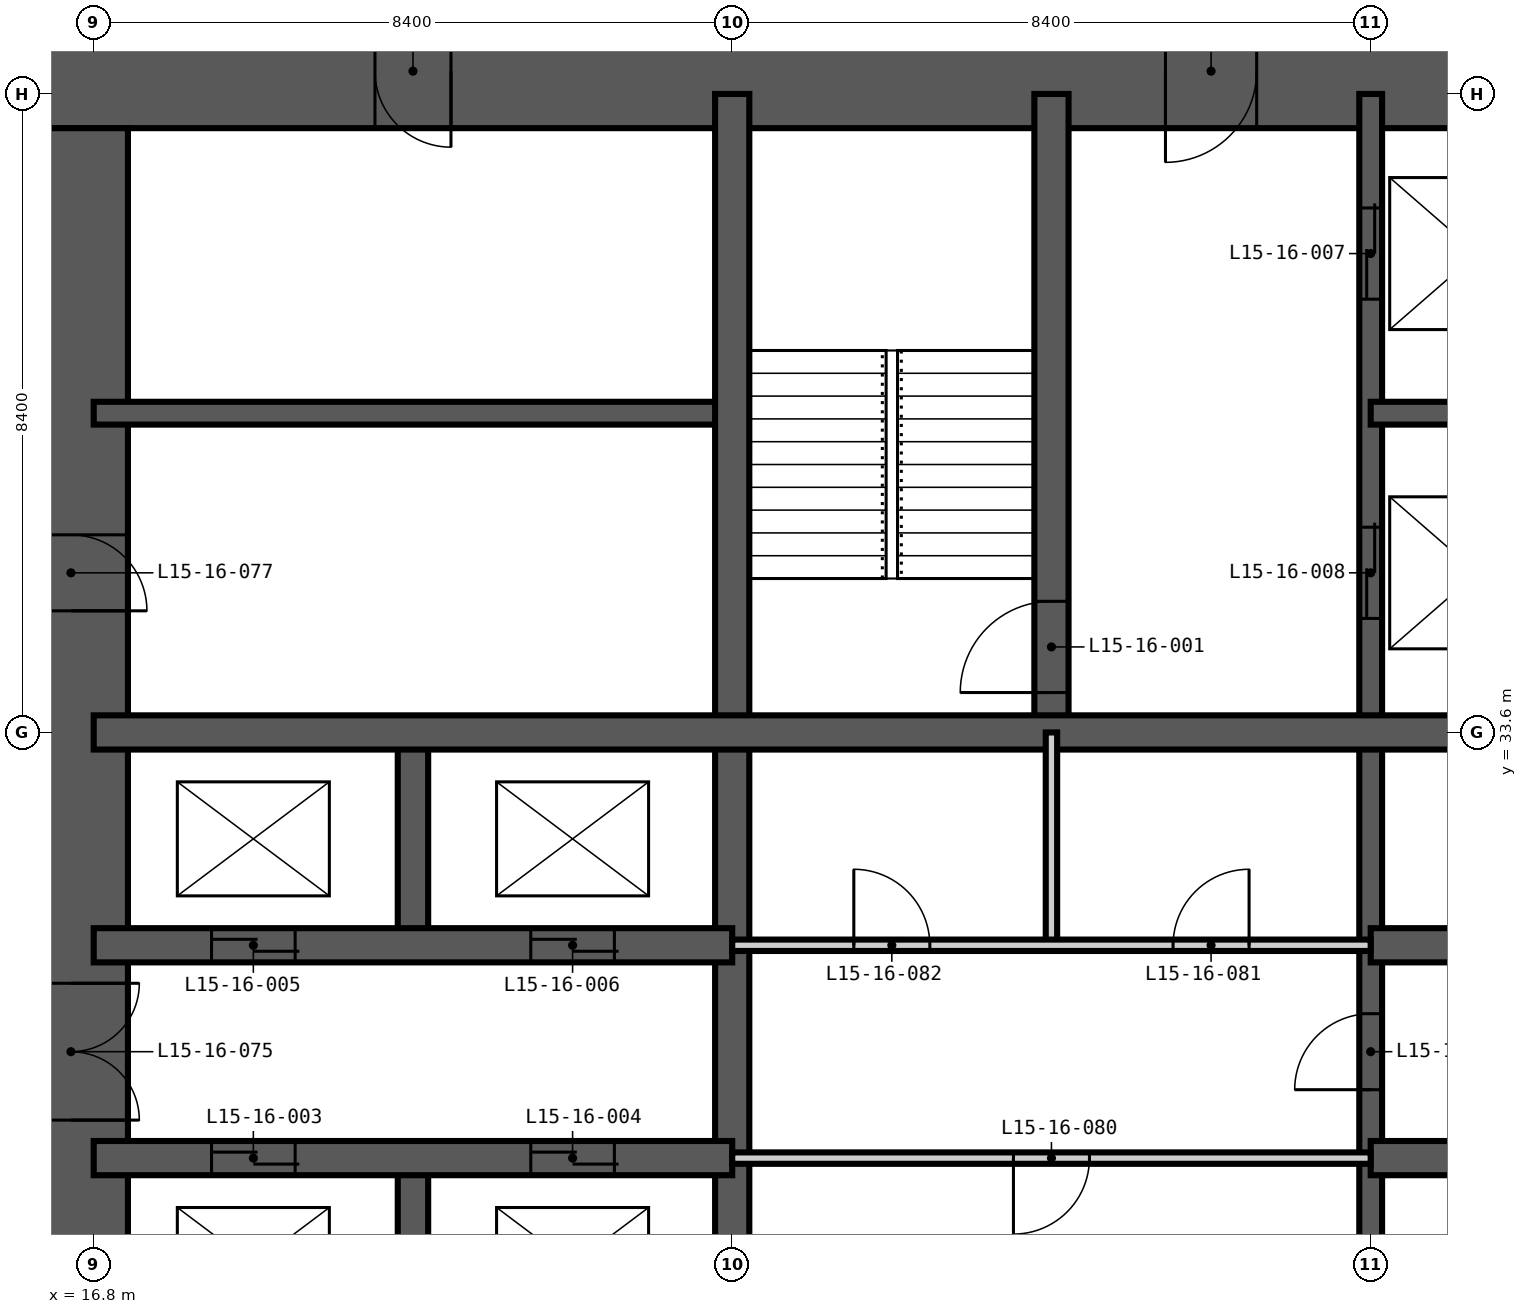
"""IFC4 building model, lengths in metres.
Left out: names, types, materials, properties, quantities, classifications, styles, units other than length and angle.
Written with IfcOpenShell. Run it as: python <this file> out.ifc"""

import sys

from ifc_helpers import new_model, si_unit, direction, frame, frame_2d, origin, place, context, subcontext, project, spatial, rectangle, extrude, element, fill, save


model = new_model("IFC4")
c1 = context("Model", 3, precision=1e-05, world=origin(), true_north=direction((0.0, 1.0)))
c2 = subcontext(c1, "Body", "Model", "MODEL_VIEW")
j1 = project(units=[si_unit("LENGTHUNIT", "METRE"), si_unit("PLANEANGLEUNIT", "RADIAN")], contexts=[c1])
p1 = place(None, origin())
s1 = spatial("IfcSite", under=j1, at=p1, CompositionType="ELEMENT")
p2 = place(p1, origin())
s2 = spatial("IfcBuilding", under=s1, at=p2, CompositionType="ELEMENT")
p3 = place(p2, frame((0.0, 0.0, 63.0)))
s3 = spatial("IfcBuildingStorey", under=s2, at=p3, CompositionType="ELEMENT", Elevation=63.0)
p4 = place(p3, frame((43.05, 42.3, -0.35), z_axis=(0.0, 0.0, 1.0), x_axis=(-1.0, 0.0, 0.0)))
e1 = element("IfcWall", 1, at=p4, inside=s3, PredefinedType="SHEAR", context=c2, shape_type="SweptSolid", body=[
    extrude(rectangle(XDim=27.3, YDim=1.5, at=frame_2d((13.65, 0.0))), origin(), (0.0, 0.0, 1.0), 3.6),
])
p5 = place(p4, frame((21.55, 0.0, 0.35)))
e2 = element("IfcOpeningElement", 2, at=p5, cuts=e1, PredefinedType="OPENING", context=c2, shape_type="SweptSolid", body=[
    extrude(rectangle(XDim=1.0, YDim=2.1, at=frame_2d((0.5, 1.05))), frame((0.0, 0.76, 0.0), z_axis=(0.0, -1.0, 0.0), x_axis=(1.0, 0.0, 0.0)), (0.0, 0.0, 1.0), 1.52),
])
p6 = place(p4, frame((10.95, 0.0, 0.35)))
e3 = element("IfcOpeningElement", 3, at=p6, cuts=e1, PredefinedType="OPENING", context=c2, shape_type="SweptSolid", body=[
    extrude(rectangle(XDim=1.2, YDim=2.2, at=frame_2d((0.6, 1.1))), frame((0.0, 0.76, 0.0), z_axis=(0.0, -1.0, 0.0), x_axis=(1.0, 0.0, 0.0)), (0.0, 0.0, 1.0), 1.52),
])
p7 = place(p3, frame((16.5, 41.55, -0.35), z_axis=(0.0, 0.0, 1.0), x_axis=(0.0, -1.0, 0.0)))
e4 = element("IfcWall", 4, at=p7, inside=s3, PredefinedType="SHEAR", context=c2, shape_type="SweptSolid", body=[
    extrude(rectangle(XDim=24.3, YDim=1.5, at=frame_2d((12.15, 0.0))), origin(), (0.0, 0.0, 1.0), 3.6),
])
p8 = place(p7, frame((11.25, 0.0, 0.35)))
e5 = element("IfcOpeningElement", 5, at=p8, cuts=e4, PredefinedType="OPENING", context=c2, shape_type="SweptSolid", body=[
    extrude(rectangle(XDim=1.8, YDim=2.2, at=frame_2d((0.9, 1.1))), frame((0.0, 0.76, 0.0), z_axis=(0.0, -1.0, 0.0), x_axis=(1.0, 0.0, 0.0)), (0.0, 0.0, 1.0), 1.52),
])
p9 = place(p7, frame((20.05, 0.0, 0.35)))
e6 = element("IfcOpeningElement", 6, at=p9, cuts=e4, PredefinedType="OPENING", context=c2, shape_type="SweptSolid", body=[
    extrude(rectangle(XDim=1.0, YDim=2.1, at=frame_2d((0.5, 1.05))), frame((0.0, 0.76, 0.0), z_axis=(0.0, -1.0, 0.0), x_axis=(1.0, 0.0, 0.0)), (0.0, 0.0, 1.0), 1.52),
])
p10 = place(p7, frame((5.35, 0.0, 0.35)))
e7 = element("IfcOpeningElement", 7, at=p10, cuts=e4, PredefinedType="OPENING", context=c2, shape_type="SweptSolid", body=[
    extrude(rectangle(XDim=1.0, YDim=2.1, at=frame_2d((0.5, 1.05))), frame((0.0, 0.76, 0.0), z_axis=(0.0, -1.0, 0.0), x_axis=(1.0, 0.0, 0.0)), (0.0, 0.0, 1.0), 1.52),
])
p11 = place(p3, frame((33.6, 16.8, -0.35), z_axis=(0.0, 0.0, 1.0), x_axis=(0.0, 1.0, 0.0)))
e8 = element("IfcWall", 8, at=p11, inside=s3, PredefinedType="SHEAR", context=c2, shape_type="SweptSolid", body=[
    extrude(rectangle(XDim=25.2, YDim=0.3, at=frame_2d((12.6, 0.0))), origin(), (0.0, 0.0, 1.0), 3.6),
])
p12 = place(p11, frame((22.5, 0.0, 0.35)))
e9 = element("IfcOpeningElement", 9, at=p12, cuts=e8, PredefinedType="OPENING", context=c2, shape_type="SweptSolid", body=[
    extrude(rectangle(XDim=1.2, YDim=2.2, at=frame_2d((0.6, 1.1))), frame((0.0, 0.16, 0.0), z_axis=(0.0, -1.0, 0.0), x_axis=(1.0, 0.0, 0.0)), (0.0, 0.0, 1.0), 0.32),
])
p13 = place(p11, frame((18.3, 0.0, 0.35)))
e10 = element("IfcOpeningElement", 10, at=p13, cuts=e8, PredefinedType="OPENING", context=c2, shape_type="SweptSolid", body=[
    extrude(rectangle(XDim=1.2, YDim=2.2, at=frame_2d((0.6, 1.1))), frame((0.0, 0.16, 0.0), z_axis=(0.0, -1.0, 0.0), x_axis=(1.0, 0.0, 0.0)), (0.0, 0.0, 1.0), 0.32),
])
p14 = place(p11, frame((12.1, 0.0, 0.35)))
e11 = element("IfcOpeningElement", 11, at=p14, cuts=e8, PredefinedType="OPENING", context=c2, shape_type="SweptSolid", body=[
    extrude(rectangle(XDim=1.0, YDim=2.1, at=frame_2d((0.5, 1.05))), frame((0.0, 0.16, 0.0), z_axis=(0.0, -1.0, 0.0), x_axis=(1.0, 0.0, 0.0)), (0.0, 0.0, 1.0), 0.32),
])
p15 = place(p3, frame((16.8, 37.8, -0.35), z_axis=(0.0, 0.0, 1.0), x_axis=(1.0, 0.0, 0.0)))
e12 = element("IfcWall", 12, at=p15, inside=s3, PredefinedType="SHEAR", context=c2, shape_type="SweptSolid", body=[
    extrude(rectangle(XDim=8.4, YDim=0.3, at=frame_2d((4.2, 0.0))), origin(), (0.0, 0.0, 1.0), 3.6),
])
p16 = place(p3, frame((33.6, 37.8, -0.35), z_axis=(0.0, 0.0, 1.0), x_axis=(1.0, 0.0, 0.0)))
e13 = element("IfcWall", 13, at=p16, inside=s3, PredefinedType="SHEAR", context=c2, shape_type="SweptSolid", body=[
    extrude(rectangle(XDim=2.8, YDim=0.3, at=frame_2d((1.4, 0.0))), origin(), (0.0, 0.0, 1.0), 3.6),
])
for number, where, z_axis, x_axis in (
    (14, (21.0, 25.2, -0.35), (0.0, 0.0, 1.0), (0.0, 1.0, 0.0)),
    (15, (21.0, 30.8, -0.35), (0.0, 0.0, 1.0), (0.0, 1.0, 0.0)),
):
    element("IfcWall", number, at=place(p3, frame(where, z_axis=z_axis, x_axis=x_axis)), inside=s3, PredefinedType="SHEAR", context=c2, shape_type="SweptSolid", body=[
        extrude(rectangle(XDim=2.8, YDim=0.4, at=frame_2d((1.4, 0.0))), origin(), (0.0, 0.0, 1.0), 3.6),
    ])
p17 = place(p3, frame((25.2, 16.8, -0.35), z_axis=(0.0, 0.0, 1.0), x_axis=(0.0, 1.0, 0.0)))
e16 = element("IfcWall", 16, at=p17, inside=s3, PredefinedType="SHEAR", context=c2, shape_type="SweptSolid", body=[
    extrude(rectangle(XDim=25.2, YDim=0.45, at=frame_2d((12.6, 0.0))), origin(), (0.0, 0.0, 1.0), 3.6),
])
p18 = place(p3, frame((29.4, 33.6, -0.35), z_axis=(0.0, 0.0, 1.0), x_axis=(0.0, 1.0, 0.0)))
e17 = element("IfcWall", 17, at=p18, inside=s3, PredefinedType="SHEAR", context=c2, shape_type="SweptSolid", body=[
    extrude(rectangle(XDim=8.4, YDim=0.45, at=frame_2d((4.2, 0.0))), origin(), (0.0, 0.0, 1.0), 3.6),
])
p19 = place(p18, frame((0.525, 0.0, 0.35)))
e18 = element("IfcOpeningElement", 18, at=p19, cuts=e17, PredefinedType="OPENING", context=c2, shape_type="SweptSolid", body=[
    extrude(rectangle(XDim=1.2, YDim=2.2, at=frame_2d((0.6, 1.1))), frame((0.0, 0.235, 0.0), z_axis=(0.0, -1.0, 0.0), x_axis=(1.0, 0.0, 0.0)), (0.0, 0.0, 1.0), 0.47),
])
p20 = place(p3, frame((16.8, 28.0, -0.35), z_axis=(0.0, 0.0, 1.0), x_axis=(1.0, 0.0, 0.0)))
e19 = element("IfcWall", 19, at=p20, inside=s3, PredefinedType="SHEAR", context=c2, shape_type="SweptSolid", body=[
    extrude(rectangle(XDim=8.4, YDim=0.45, at=frame_2d((4.2, 0.0))), origin(), (0.0, 0.0, 1.0), 3.6),
])
p21 = place(p20, frame((1.55, 0.0, 0.35)))
e20 = element("IfcOpeningElement", 20, at=p21, cuts=e19, PredefinedType="OPENING", context=c2, shape_type="SweptSolid", body=[
    extrude(rectangle(XDim=1.1, YDim=2.2, at=frame_2d((0.55, 1.1))), frame((0.0, 0.235, 0.0), z_axis=(0.0, -1.0, 0.0), x_axis=(1.0, 0.0, 0.0)), (0.0, 0.0, 1.0), 0.47),
])
p22 = place(p20, frame((5.75, 0.0, 0.35)))
e21 = element("IfcOpeningElement", 21, at=p22, cuts=e19, PredefinedType="OPENING", context=c2, shape_type="SweptSolid", body=[
    extrude(rectangle(XDim=1.1, YDim=2.2, at=frame_2d((0.55, 1.1))), frame((0.0, 0.235, 0.0), z_axis=(0.0, -1.0, 0.0), x_axis=(1.0, 0.0, 0.0)), (0.0, 0.0, 1.0), 0.47),
])
p23 = place(p3, frame((33.6, 28.0, -0.35), z_axis=(0.0, 0.0, 1.0), x_axis=(1.0, 0.0, 0.0)))
e22 = element("IfcWall", 22, at=p23, inside=s3, PredefinedType="SHEAR", context=c2, shape_type="SweptSolid", body=[
    extrude(rectangle(XDim=8.4, YDim=0.45, at=frame_2d((4.2, 0.0))), origin(), (0.0, 0.0, 1.0), 3.6),
])
p24 = place(p3, frame((16.8, 30.8, -0.35), z_axis=(0.0, 0.0, 1.0), x_axis=(1.0, 0.0, 0.0)))
e23 = element("IfcWall", 23, at=p24, inside=s3, PredefinedType="SHEAR", context=c2, shape_type="SweptSolid", body=[
    extrude(rectangle(XDim=8.4, YDim=0.45, at=frame_2d((4.2, 0.0))), origin(), (0.0, 0.0, 1.0), 3.6),
])
p25 = place(p24, frame((1.55, 0.0, 0.35)))
e24 = element("IfcOpeningElement", 24, at=p25, cuts=e23, PredefinedType="OPENING", context=c2, shape_type="SweptSolid", body=[
    extrude(rectangle(XDim=1.1, YDim=2.2, at=frame_2d((0.55, 1.1))), frame((0.0, 0.235, 0.0), z_axis=(0.0, -1.0, 0.0), x_axis=(1.0, 0.0, 0.0)), (0.0, 0.0, 1.0), 0.47),
])
p26 = place(p24, frame((5.75, 0.0, 0.35)))
e25 = element("IfcOpeningElement", 25, at=p26, cuts=e23, PredefinedType="OPENING", context=c2, shape_type="SweptSolid", body=[
    extrude(rectangle(XDim=1.1, YDim=2.2, at=frame_2d((0.55, 1.1))), frame((0.0, 0.235, 0.0), z_axis=(0.0, -1.0, 0.0), x_axis=(1.0, 0.0, 0.0)), (0.0, 0.0, 1.0), 0.47),
])
p27 = place(p3, frame((33.6, 30.8, -0.35), z_axis=(0.0, 0.0, 1.0), x_axis=(1.0, 0.0, 0.0)))
e26 = element("IfcWall", 26, at=p27, inside=s3, PredefinedType="SHEAR", context=c2, shape_type="SweptSolid", body=[
    extrude(rectangle(XDim=8.4, YDim=0.45, at=frame_2d((4.2, 0.0))), origin(), (0.0, 0.0, 1.0), 3.6),
])
p28 = place(p27, frame((1.6, 0.0, 0.35)))
e27 = element("IfcOpeningElement", 27, at=p28, cuts=e26, PredefinedType="OPENING", context=c2, shape_type="SweptSolid", body=[
    extrude(rectangle(XDim=1.0, YDim=2.1, at=frame_2d((0.5, 1.05))), frame((0.0, 0.235, 0.0), z_axis=(0.0, -1.0, 0.0), x_axis=(1.0, 0.0, 0.0)), (0.0, 0.0, 1.0), 0.47),
])
p29 = place(p27, frame((4.6, 0.0, 0.35)))
e28 = element("IfcOpeningElement", 28, at=p29, cuts=e26, PredefinedType="OPENING", context=c2, shape_type="SweptSolid", body=[
    extrude(rectangle(XDim=1.0, YDim=2.1, at=frame_2d((0.5, 1.05))), frame((0.0, 0.235, 0.0), z_axis=(0.0, -1.0, 0.0), x_axis=(1.0, 0.0, 0.0)), (0.0, 0.0, 1.0), 0.47),
])
p30 = place(p3, frame((16.8, 33.6, -0.35), z_axis=(0.0, 0.0, 1.0), x_axis=(1.0, 0.0, 0.0)))
e29 = element("IfcWall", 29, at=p30, inside=s3, PredefinedType="SHEAR", context=c2, shape_type="SweptSolid", body=[
    extrude(rectangle(XDim=25.2, YDim=0.45, at=frame_2d((12.6, 0.0))), origin(), (0.0, 0.0, 1.0), 3.6),
])
p31 = place(p3, frame((29.4, 30.8, 0.0), z_axis=(0.0, 0.0, 1.0), x_axis=(0.0, 1.0, 0.0)))
e30 = element("IfcWall", 30, at=p31, inside=s3, PredefinedType="PARTITIONING", context=c2, shape_type="SweptSolid", body=[
    extrude(rectangle(XDim=2.8, YDim=0.15, at=frame_2d((1.4, 0.0))), origin(), (0.0, 0.0, 1.0), 3.25),
])
p32 = place(p3, frame((25.2, 28.0, 0.0), z_axis=(0.0, 0.0, 1.0), x_axis=(1.0, 0.0, 0.0)))
e31 = element("IfcWall", 31, at=p32, inside=s3, PredefinedType="PARTITIONING", context=c2, shape_type="SweptSolid", body=[
    extrude(rectangle(XDim=8.4, YDim=0.15, at=frame_2d((4.2, 0.0))), origin(), (0.0, 0.0, 1.0), 3.25),
])
p33 = place(p32, frame((3.7, 0.0, 0.0)))
e32 = element("IfcOpeningElement", 32, at=p33, cuts=e31, PredefinedType="OPENING", context=c2, shape_type="SweptSolid", body=[
    extrude(rectangle(XDim=1.0, YDim=2.1, at=frame_2d((0.5, 1.05))), frame((0.0, 0.085, 0.0), z_axis=(0.0, -1.0, 0.0), x_axis=(1.0, 0.0, 0.0)), (0.0, 0.0, 1.0), 0.17),
])
p34 = place(p3, frame((25.2, 30.8, 0.0), z_axis=(0.0, 0.0, 1.0), x_axis=(1.0, 0.0, 0.0)))
e33 = element("IfcWall", 33, at=p34, inside=s3, PredefinedType="PARTITIONING", context=c2, shape_type="SweptSolid", body=[
    extrude(rectangle(XDim=8.4, YDim=0.15, at=frame_2d((4.2, 0.0))), origin(), (0.0, 0.0, 1.0), 3.25),
])
p35 = place(p34, frame((5.8, 0.0, 0.0)))
e34 = element("IfcOpeningElement", 34, at=p35, cuts=e33, PredefinedType="OPENING", context=c2, shape_type="SweptSolid", body=[
    extrude(rectangle(XDim=1.0, YDim=2.1, at=frame_2d((0.5, 1.05))), frame((0.0, 0.085, 0.0), z_axis=(0.0, -1.0, 0.0), x_axis=(1.0, 0.0, 0.0)), (0.0, 0.0, 1.0), 0.17),
])
p36 = place(p34, frame((1.6, 0.0, 0.0)))
e35 = element("IfcOpeningElement", 35, at=p36, cuts=e33, PredefinedType="OPENING", context=c2, shape_type="SweptSolid", body=[
    extrude(rectangle(XDim=1.0, YDim=2.1, at=frame_2d((0.5, 1.05))), frame((0.0, 0.085, 0.0), z_axis=(0.0, -1.0, 0.0), x_axis=(1.0, 0.0, 0.0)), (0.0, 0.0, 1.0), 0.17),
])
p37 = place(p19, origin())
e36 = element("IfcDoor", 36, at=p37, inside=s3, OperationType="SINGLE_SWING_LEFT", PredefinedType="DOOR", context=c2, shape_type="SweptSolid", body=[
    extrude(rectangle(XDim=1.2, YDim=2.2, at=frame_2d((0.6, 1.1))), frame((0.0, 0.025, 0.0), z_axis=(0.0, -1.0, 0.0), x_axis=(1.0, 0.0, 0.0)), (0.0, 0.0, 1.0), 0.05),
])
fill(e18, e36)
p38 = place(p21, origin())
e37 = element("IfcDoor", 37, at=p38, inside=s3, OperationType="DOUBLE_DOOR_SLIDING", PredefinedType="DOOR", context=c2, shape_type="SweptSolid", body=[
    extrude(rectangle(XDim=1.1, YDim=2.2, at=frame_2d((0.55, 1.1))), frame((0.0, 0.025, 0.0), z_axis=(0.0, -1.0, 0.0), x_axis=(1.0, 0.0, 0.0)), (0.0, 0.0, 1.0), 0.05),
])
fill(e20, e37)
p39 = place(p22, origin())
e38 = element("IfcDoor", 38, at=p39, inside=s3, OperationType="DOUBLE_DOOR_SLIDING", PredefinedType="DOOR", context=c2, shape_type="SweptSolid", body=[
    extrude(rectangle(XDim=1.1, YDim=2.2, at=frame_2d((0.55, 1.1))), frame((0.0, 0.025, 0.0), z_axis=(0.0, -1.0, 0.0), x_axis=(1.0, 0.0, 0.0)), (0.0, 0.0, 1.0), 0.05),
])
fill(e21, e38)
p40 = place(p25, origin())
e39 = element("IfcDoor", 39, at=p40, inside=s3, OperationType="DOUBLE_DOOR_SLIDING", PredefinedType="DOOR", context=c2, shape_type="SweptSolid", body=[
    extrude(rectangle(XDim=1.1, YDim=2.2, at=frame_2d((0.55, 1.1))), frame((0.0, 0.025, 0.0), z_axis=(0.0, -1.0, 0.0), x_axis=(1.0, 0.0, 0.0)), (0.0, 0.0, 1.0), 0.05),
])
fill(e24, e39)
p41 = place(p26, origin())
e40 = element("IfcDoor", 40, at=p41, inside=s3, OperationType="DOUBLE_DOOR_SLIDING", PredefinedType="DOOR", context=c2, shape_type="SweptSolid", body=[
    extrude(rectangle(XDim=1.1, YDim=2.2, at=frame_2d((0.55, 1.1))), frame((0.0, 0.025, 0.0), z_axis=(0.0, -1.0, 0.0), x_axis=(1.0, 0.0, 0.0)), (0.0, 0.0, 1.0), 0.05),
])
fill(e25, e40)
p42 = place(p12, origin())
e41 = element("IfcDoor", 41, at=p42, inside=s3, OperationType="DOUBLE_DOOR_SLIDING", PredefinedType="DOOR", context=c2, shape_type="SweptSolid", body=[
    extrude(rectangle(XDim=1.2, YDim=2.2, at=frame_2d((0.6, 1.1))), frame((0.0, 0.025, 0.0), z_axis=(0.0, -1.0, 0.0), x_axis=(1.0, 0.0, 0.0)), (0.0, 0.0, 1.0), 0.05),
])
fill(e9, e41)
p43 = place(p13, origin())
e42 = element("IfcDoor", 42, at=p43, inside=s3, OperationType="DOUBLE_DOOR_SLIDING", PredefinedType="DOOR", context=c2, shape_type="SweptSolid", body=[
    extrude(rectangle(XDim=1.2, YDim=2.2, at=frame_2d((0.6, 1.1))), frame((0.0, 0.025, 0.0), z_axis=(0.0, -1.0, 0.0), x_axis=(1.0, 0.0, 0.0)), (0.0, 0.0, 1.0), 0.05),
])
fill(e10, e42)
p44 = place(p8, origin())
e43 = element("IfcDoor", 43, at=p44, inside=s3, OperationType="DOUBLE_DOOR_DOUBLE_SWING", PredefinedType="DOOR", context=c2, shape_type="SweptSolid", body=[
    extrude(rectangle(XDim=1.8, YDim=2.2, at=frame_2d((0.9, 1.1))), frame((0.0, 0.025, 0.0), z_axis=(0.0, -1.0, 0.0), x_axis=(1.0, 0.0, 0.0)), (0.0, 0.0, 1.0), 0.05),
])
fill(e5, e43)
p45 = place(p10, origin())
e44 = element("IfcDoor", 44, at=p45, inside=s3, OperationType="SINGLE_SWING_RIGHT", PredefinedType="DOOR", context=c2, shape_type="SweptSolid", body=[
    extrude(rectangle(XDim=1.0, YDim=2.1, at=frame_2d((0.5, 1.05))), frame((0.0, 0.025, 0.0), z_axis=(0.0, -1.0, 0.0), x_axis=(1.0, 0.0, 0.0)), (0.0, 0.0, 1.0), 0.05),
])
fill(e7, e44)
p46 = place(p5, origin())
e45 = element("IfcDoor", 45, at=p46, inside=s3, OperationType="SINGLE_SWING_LEFT", PredefinedType="DOOR", context=c2, shape_type="SweptSolid", body=[
    extrude(rectangle(XDim=1.0, YDim=2.1, at=frame_2d((0.5, 1.05))), frame((0.0, 0.025, 0.0), z_axis=(0.0, -1.0, 0.0), x_axis=(1.0, 0.0, 0.0)), (0.0, 0.0, 1.0), 0.05),
])
fill(e2, e45)
p47 = place(p14, origin())
e46 = element("IfcDoor", 46, at=p47, inside=s3, OperationType="SINGLE_SWING_LEFT", PredefinedType="DOOR", context=c2, shape_type="SweptSolid", body=[
    extrude(rectangle(XDim=1.0, YDim=2.1, at=frame_2d((0.5, 1.05))), frame((0.0, 0.025, 0.0), z_axis=(0.0, -1.0, 0.0), x_axis=(1.0, 0.0, 0.0)), (0.0, 0.0, 1.0), 0.05),
])
fill(e11, e46)
p48 = place(p33, frame((1.0, 0.0, 0.0), z_axis=(0.0, 0.0, 1.0), x_axis=(-1.0, 0.0, 0.0)))
e47 = element("IfcDoor", 47, at=p48, inside=s3, OperationType="SINGLE_SWING_RIGHT", PredefinedType="DOOR", context=c2, shape_type="SweptSolid", body=[
    extrude(rectangle(XDim=1.0, YDim=2.1, at=frame_2d((0.5, 1.05))), frame((0.0, 0.025, 0.0), z_axis=(0.0, -1.0, 0.0), x_axis=(1.0, 0.0, 0.0)), (0.0, 0.0, 1.0), 0.05),
])
fill(e32, e47)
p49 = place(p35, origin())
e48 = element("IfcDoor", 48, at=p49, inside=s3, OperationType="SINGLE_SWING_RIGHT", PredefinedType="DOOR", context=c2, shape_type="SweptSolid", body=[
    extrude(rectangle(XDim=1.0, YDim=2.1, at=frame_2d((0.5, 1.05))), frame((0.0, 0.025, 0.0), z_axis=(0.0, -1.0, 0.0), x_axis=(1.0, 0.0, 0.0)), (0.0, 0.0, 1.0), 0.05),
])
fill(e34, e48)
p50 = place(p36, origin())
e49 = element("IfcDoor", 49, at=p50, inside=s3, OperationType="SINGLE_SWING_LEFT", PredefinedType="DOOR", context=c2, shape_type="SweptSolid", body=[
    extrude(rectangle(XDim=1.0, YDim=2.1, at=frame_2d((0.5, 1.05))), frame((0.0, 0.025, 0.0), z_axis=(0.0, -1.0, 0.0), x_axis=(1.0, 0.0, 0.0)), (0.0, 0.0, 1.0), 0.05),
])
fill(e35, e49)
p51 = place(p6, origin())
e50 = element("IfcDoor", 50, at=p51, inside=s3, OperationType="SINGLE_SWING_RIGHT", PredefinedType="DOOR", context=c2, shape_type="SweptSolid", body=[
    extrude(rectangle(XDim=1.2, YDim=2.2, at=frame_2d((0.6, 1.1))), frame((0.0, 0.025, 0.0), z_axis=(0.0, -1.0, 0.0), x_axis=(1.0, 0.0, 0.0)), (0.0, 0.0, 1.0), 0.05),
])
fill(e3, e50)
save(model, sys.argv[1])
